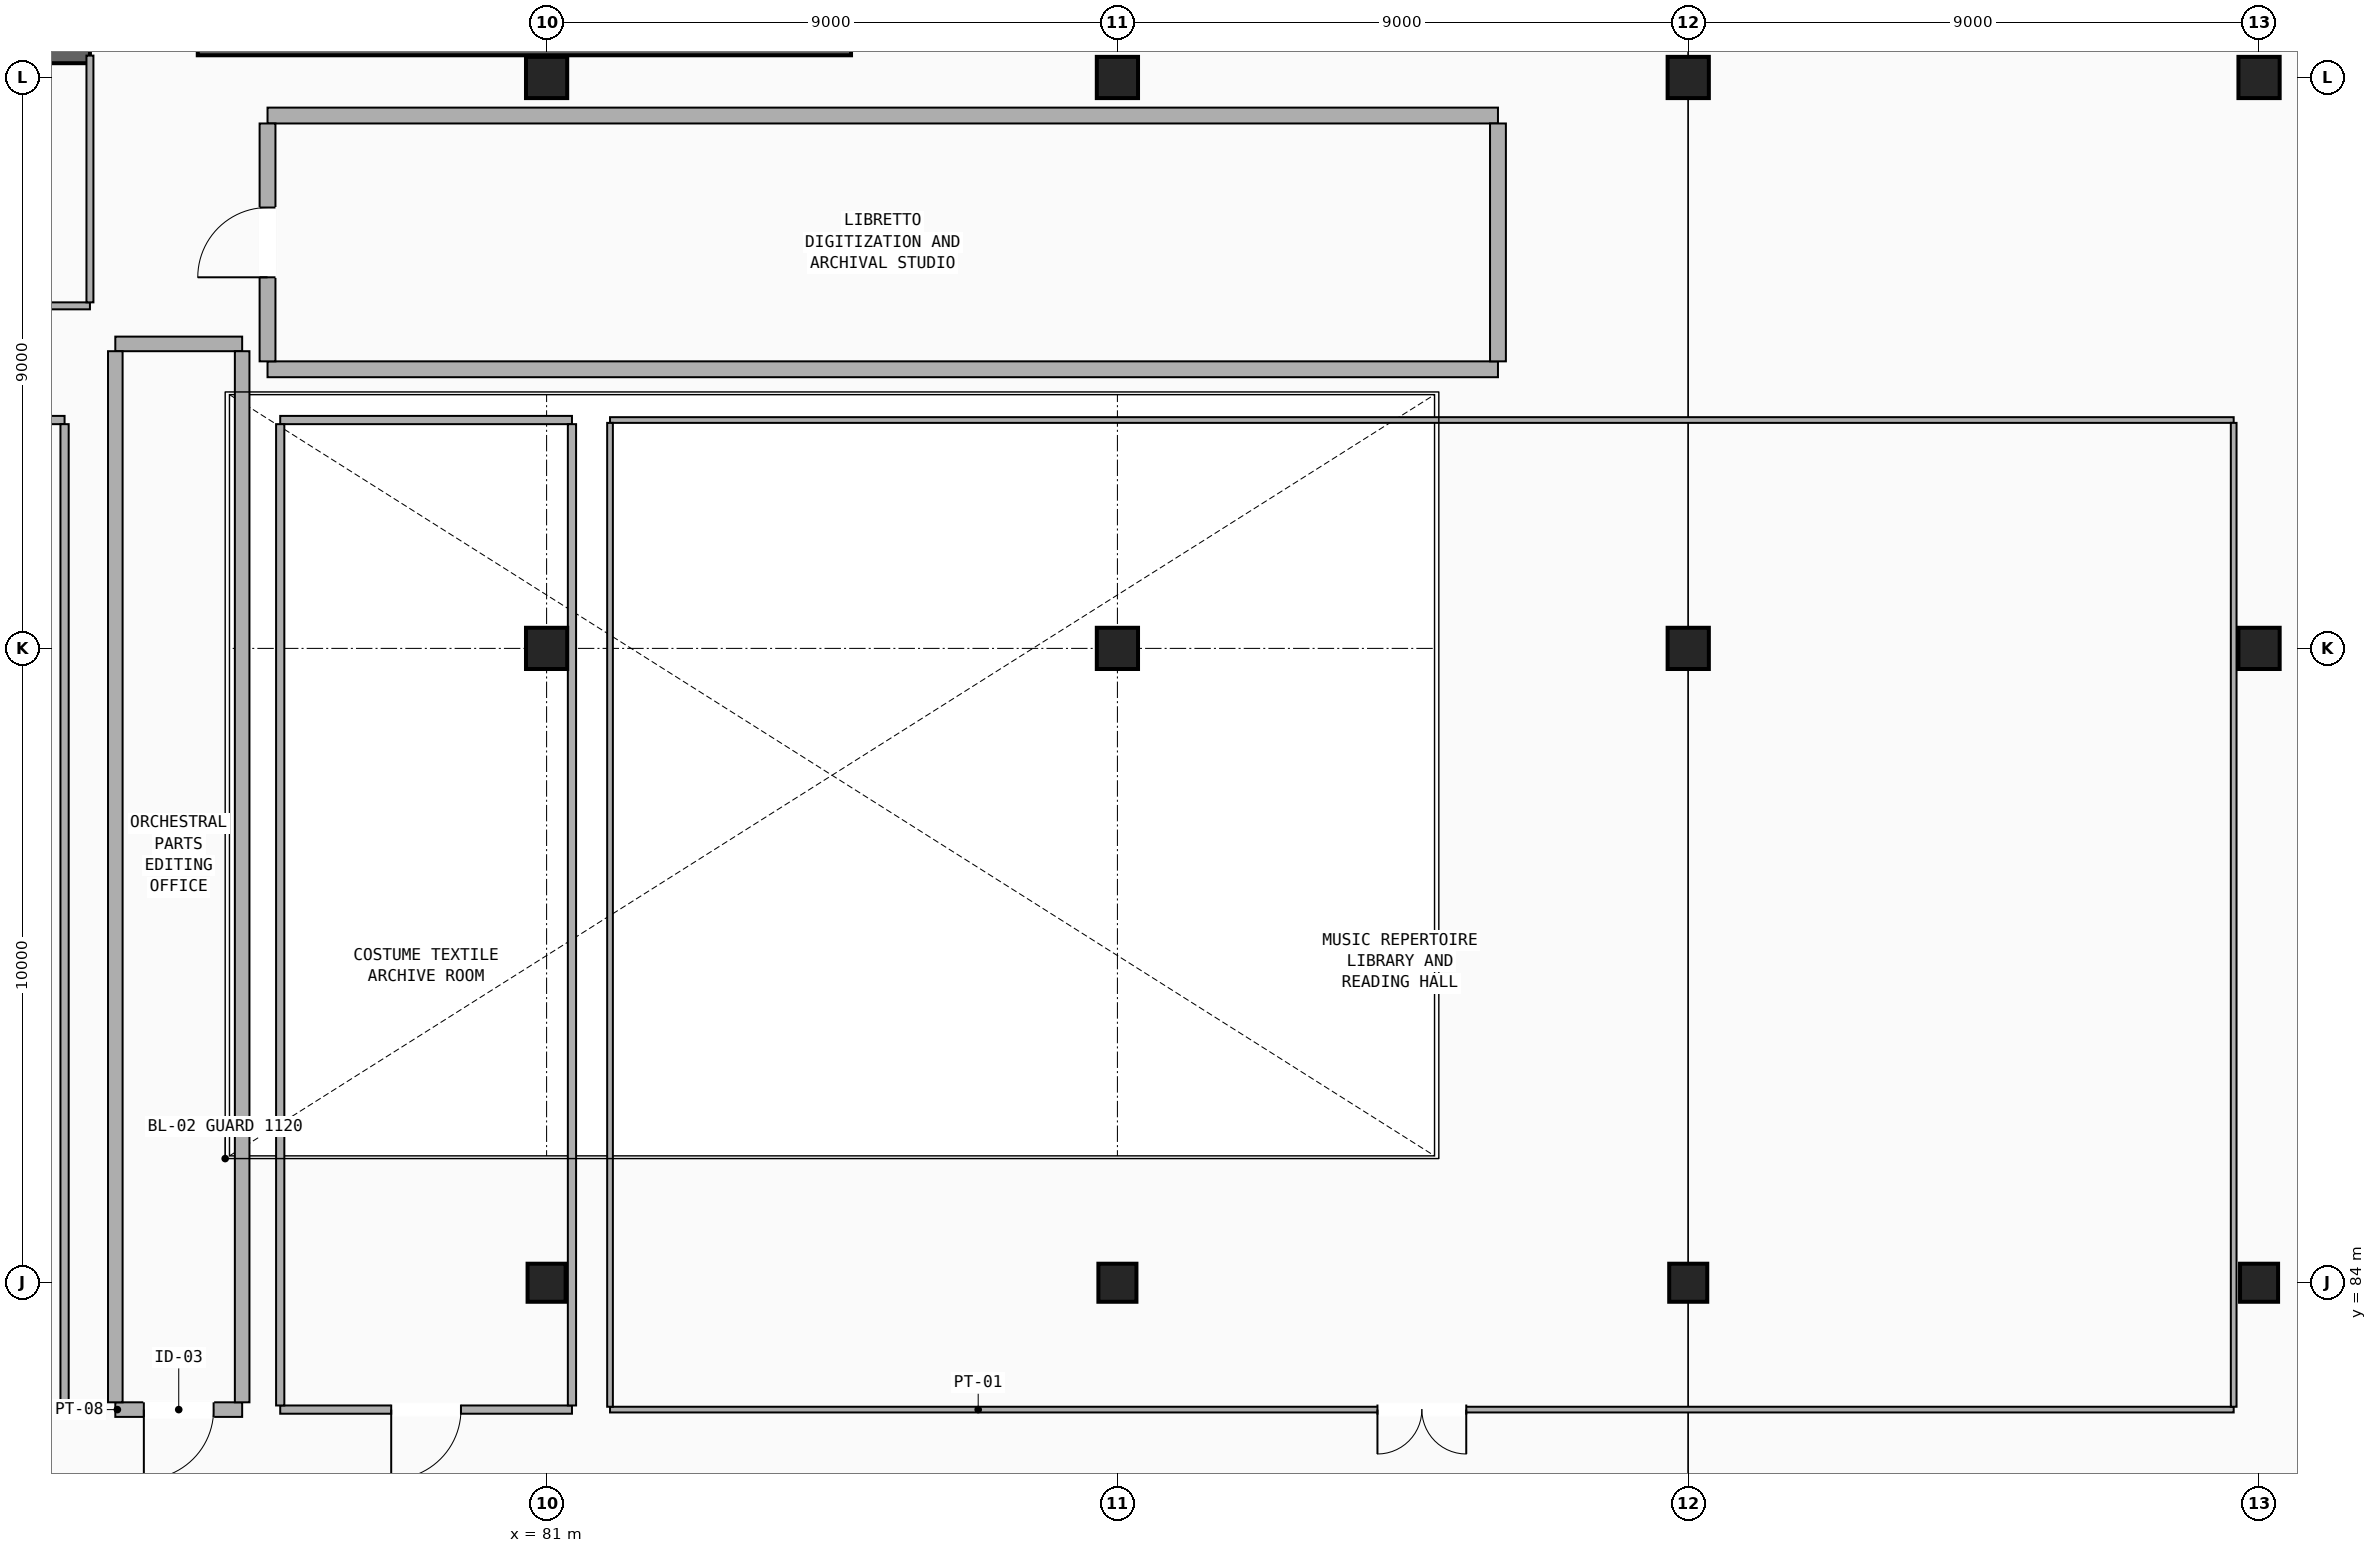
"""IFC4 building model, lengths in metres.
Left out: names, types, materials, properties, quantities, classifications, styles, units other than length and angle.
Written with IfcOpenShell. Run it as: python <this file> out.ifc"""

import sys

from ifc_helpers import new_model, si_unit, direction, frame, frame_2d, origin, origin_2d, place, context, subcontext, project, spatial, rectangle, extrude, element, fill, save


model = new_model("IFC4")
c1 = context("Model", 3, precision=1e-05, world=origin(), true_north=direction((0.0, 1.0)))
c2 = subcontext(c1, "Body", "Model", "MODEL_VIEW")
j1 = project(units=[si_unit("LENGTHUNIT", "METRE"), si_unit("PLANEANGLEUNIT", "RADIAN")], contexts=[c1])
p1 = place(None, origin())
s1 = spatial("IfcSite", under=j1, at=p1, CompositionType="ELEMENT")
p2 = place(p1, origin())
s2 = spatial("IfcBuilding", under=s1, at=p2, CompositionType="ELEMENT")
p3 = place(p2, frame((0.0, 0.0, 13.6)))
s3 = spatial("IfcBuildingStorey", under=s2, at=p3, CompositionType="ELEMENT", Elevation=13.6)
p4 = place(p3, frame((81.0, 84.0, 0.0), z_axis=(0.0, 0.0, 1.0), x_axis=(1.0, 0.0, 0.0)))
e1 = element("IfcColumn", 1, at=p4, inside=s3, PredefinedType="COLUMN", context=c2, shape_type="SweptSolid", body=[
    extrude(rectangle(XDim=0.6, YDim=0.6, at=origin_2d()), origin(), (0.0, 0.0, 1.0), 4.08),
])
for number, where, z_axis, x_axis in (
    (2, (81.0, 94.0, 0.0), (0.0, 0.0, 1.0), (1.0, 0.0, 0.0)),
    (3, (81.0, 103.0, 0.0), (0.0, 0.0, 1.0), (1.0, 0.0, 0.0)),
):
    element("IfcColumn", number, at=place(p3, frame(where, z_axis=z_axis, x_axis=x_axis)), inside=s3, PredefinedType="COLUMN", context=c2, shape_type="SweptSolid", body=[
        extrude(rectangle(XDim=0.65, YDim=0.65, at=origin_2d()), origin(), (0.0, 0.0, 1.0), 4.08),
    ])
p5 = place(p3, frame((90.0, 84.0, 0.0), z_axis=(0.0, 0.0, 1.0), x_axis=(1.0, 0.0, 0.0)))
e4 = element("IfcColumn", 4, at=p5, inside=s3, PredefinedType="COLUMN", context=c2, shape_type="SweptSolid", body=[
    extrude(rectangle(XDim=0.6, YDim=0.6, at=origin_2d()), origin(), (0.0, 0.0, 1.0), 4.08),
])
for number, where, z_axis, x_axis in (
    (5, (90.0, 94.0, 0.0), (0.0, 0.0, 1.0), (1.0, 0.0, 0.0)),
    (6, (90.0, 103.0, 0.0), (0.0, 0.0, 1.0), (1.0, 0.0, 0.0)),
):
    element("IfcColumn", number, at=place(p3, frame(where, z_axis=z_axis, x_axis=x_axis)), inside=s3, PredefinedType="COLUMN", context=c2, shape_type="SweptSolid", body=[
        extrude(rectangle(XDim=0.65, YDim=0.65, at=origin_2d()), origin(), (0.0, 0.0, 1.0), 4.08),
    ])
p6 = place(p3, frame((99.0, 84.0, 0.0), z_axis=(0.0, 0.0, 1.0), x_axis=(1.0, 0.0, 0.0)))
e7 = element("IfcColumn", 7, at=p6, inside=s3, PredefinedType="COLUMN", context=c2, shape_type="SweptSolid", body=[
    extrude(rectangle(XDim=0.6, YDim=0.6, at=origin_2d()), origin(), (0.0, 0.0, 1.0), 4.08),
])
for number, where, z_axis, x_axis in (
    (8, (99.0, 94.0, 0.0), (0.0, 0.0, 1.0), (1.0, 0.0, 0.0)),
    (9, (99.0, 103.0, 0.0), (0.0, 0.0, 1.0), (1.0, 0.0, 0.0)),
):
    element("IfcColumn", number, at=place(p3, frame(where, z_axis=z_axis, x_axis=x_axis)), inside=s3, PredefinedType="COLUMN", context=c2, shape_type="SweptSolid", body=[
        extrude(rectangle(XDim=0.65, YDim=0.65, at=origin_2d()), origin(), (0.0, 0.0, 1.0), 4.08),
    ])
p7 = place(p3, frame((108.0, 84.0, 0.0), z_axis=(0.0, 0.0, 1.0), x_axis=(1.0, 0.0, 0.0)))
e10 = element("IfcColumn", 10, at=p7, inside=s3, PredefinedType="COLUMN", context=c2, shape_type="SweptSolid", body=[
    extrude(rectangle(XDim=0.6, YDim=0.6, at=origin_2d()), origin(), (0.0, 0.0, 1.0), 4.08),
])
for number, where, z_axis, x_axis in (
    (11, (108.0, 94.0, 0.0), (0.0, 0.0, 1.0), (1.0, 0.0, 0.0)),
    (12, (108.0, 103.0, 0.0), (0.0, 0.0, 1.0), (1.0, 0.0, 0.0)),
):
    element("IfcColumn", number, at=place(p3, frame(where, z_axis=z_axis, x_axis=x_axis)), inside=s3, PredefinedType="COLUMN", context=c2, shape_type="SweptSolid", body=[
        extrude(rectangle(XDim=0.65, YDim=0.65, at=origin_2d()), origin(), (0.0, 0.0, 1.0), 4.08),
    ])
p8 = place(p3, frame((63.5, 103.4, 0.0), z_axis=(0.0, 0.0, 1.0), x_axis=(1.0, 0.0, 0.0)))
e13 = element("IfcWall", 13, at=p8, inside=s3, PredefinedType="SHEAR", context=c2, shape_type="SweptSolid", body=[
    extrude(rectangle(XDim=10.3, YDim=0.35, at=frame_2d((5.15, 0.0))), origin(), (0.0, 0.0, 1.0), 4.08),
])
p9 = place(p8, frame((0.45, 0.0, 0.0)))
e14 = element("IfcOpeningElement", 14, at=p9, cuts=e13, PredefinedType="OPENING", context=c2, shape_type="SweptSolid", body=[
    extrude(rectangle(XDim=1.1, YDim=2.2, at=frame_2d((0.55, 1.1))), frame((0.0, 0.185, 0.0), z_axis=(0.0, -1.0, 0.0), x_axis=(1.0, 0.0, 0.0)), (0.0, 0.0, 1.0), 0.37),
])
p10 = place(p8, frame((5.54, 0.0, 0.0)))
e15 = element("IfcOpeningElement", 15, at=p10, cuts=e13, PredefinedType="OPENING", context=c2, shape_type="SweptSolid", body=[
    extrude(rectangle(XDim=1.12, YDim=2.16, at=frame_2d((0.56, 1.08))), frame((0.0, 0.185, 0.0), z_axis=(0.0, -1.0, 0.0), x_axis=(1.0, 0.0, 0.0)), (0.0, 0.0, 1.0), 0.37),
])
p11 = place(p3, frame((75.5, 103.5, 0.0), z_axis=(0.0, 0.0, 1.0), x_axis=(1.0, 0.0, 0.0)))
e16 = element("IfcWall", 16, at=p11, inside=s3, PredefinedType="SHEAR", context=c2, shape_type="SweptSolid", body=[
    extrude(rectangle(XDim=10.3, YDim=0.3, at=frame_2d((5.15, 0.0))), origin(), (0.0, 0.0, 1.0), 4.08),
])
p12 = place(p3, frame((63.5, 99.4, 0.0), z_axis=(0.0, 0.0, 1.0), x_axis=(1.0, 0.0, 0.0)))
e17 = element("IfcWall", 17, at=p12, inside=s3, PredefinedType="PARTITIONING", context=c2, shape_type="SweptSolid", body=[
    extrude(rectangle(XDim=10.3, YDim=0.11, at=frame_2d((5.15, 0.0))), origin(), (0.0, 0.0, 1.0), 3.14),
])
p13 = place(p12, frame((4.45, 0.0, 0.0)))
e18 = element("IfcOpeningElement", 18, at=p13, cuts=e17, PredefinedType="OPENING", context=c2, shape_type="SweptSolid", body=[
    extrude(rectangle(XDim=1.4, YDim=2.2, at=frame_2d((0.7, 1.1))), frame((0.0, 0.065, 0.0), z_axis=(0.0, -1.0, 0.0), x_axis=(1.0, 0.0, 0.0)), (0.0, 0.0, 1.0), 0.13),
])
p14 = place(p3, frame((73.8, 99.455, 0.0), z_axis=(0.0, 0.0, 1.0), x_axis=(0.0, 1.0, 0.0)))
e19 = element("IfcWall", 19, at=p14, inside=s3, PredefinedType="PARTITIONING", context=c2, shape_type="SweptSolid", body=[
    extrude(rectangle(XDim=3.89, YDim=0.11, at=frame_2d((1.945, 0.0))), origin(), (0.0, 0.0, 1.0), 2.97),
])
p15 = place(p3, frame((82.0, 82.0, 0.0), z_axis=(0.0, 0.0, 1.0), x_axis=(1.0, 0.0, 0.0)))
e20 = element("IfcWall", 20, at=p15, inside=s3, PredefinedType="PARTITIONING", context=c2, shape_type="SweptSolid", body=[
    extrude(rectangle(XDim=25.6, YDim=0.09, at=frame_2d((12.8, 0.0))), origin(), (0.0, 0.0, 1.0), 3.11),
])
p16 = place(p15, frame((12.1, 0.0, 0.0)))
e21 = element("IfcOpeningElement", 21, at=p16, cuts=e20, PredefinedType="OPENING", context=c2, shape_type="SweptSolid", body=[
    extrude(rectangle(XDim=1.4, YDim=2.2, at=frame_2d((0.7, 1.1))), frame((0.0, 0.055, 0.0), z_axis=(0.0, -1.0, 0.0), x_axis=(1.0, 0.0, 0.0)), (0.0, 0.0, 1.0), 0.11),
])
p17 = place(p3, frame((82.0, 97.6, 0.0), z_axis=(0.0, 0.0, 1.0), x_axis=(1.0, 0.0, 0.0)))
e22 = element("IfcWall", 22, at=p17, inside=s3, PredefinedType="PARTITIONING", context=c2, shape_type="SweptSolid", body=[
    extrude(rectangle(XDim=25.6, YDim=0.09, at=frame_2d((12.8, 0.0))), origin(), (0.0, 0.0, 1.0), 2.97),
])
p18 = place(p3, frame((82.0, 82.045, 0.0), z_axis=(0.0, 0.0, 1.0), x_axis=(0.0, 1.0, 0.0)))
e23 = element("IfcWall", 23, at=p18, inside=s3, PredefinedType="PARTITIONING", context=c2, shape_type="SweptSolid", body=[
    extrude(rectangle(XDim=15.51, YDim=0.09, at=frame_2d((7.755, 0.0))), origin(), (0.0, 0.0, 1.0), 2.92),
])
p19 = place(p3, frame((107.6, 82.045, 0.0), z_axis=(0.0, 0.0, 1.0), x_axis=(0.0, 1.0, 0.0)))
e24 = element("IfcWall", 24, at=p19, inside=s3, PredefinedType="PARTITIONING", context=c2, shape_type="SweptSolid", body=[
    extrude(rectangle(XDim=15.51, YDim=0.09, at=frame_2d((7.755, 0.0))), origin(), (0.0, 0.0, 1.0), 2.82),
])
p20 = place(p3, frame((74.2, 82.0, 0.0), z_axis=(0.0, 0.0, 1.0), x_axis=(1.0, 0.0, 0.0)))
e25 = element("IfcWall", 25, at=p20, inside=s3, PredefinedType="PARTITIONING", context=c2, shape_type="SweptSolid", body=[
    extrude(rectangle(XDim=2.0, YDim=0.23, at=frame_2d((1.0, 0.0))), origin(), (0.0, 0.0, 1.0), 3.84),
])
p21 = place(p20, frame((0.45, 0.0, 0.0)))
e26 = element("IfcOpeningElement", 26, at=p21, cuts=e25, PredefinedType="OPENING", context=c2, shape_type="SweptSolid", body=[
    extrude(rectangle(XDim=1.1, YDim=2.2, at=frame_2d((0.55, 1.1))), frame((0.0, 0.125, 0.0), z_axis=(0.0, -1.0, 0.0), x_axis=(1.0, 0.0, 0.0)), (0.0, 0.0, 1.0), 0.25),
])
p22 = place(p3, frame((74.2, 98.8, 0.0), z_axis=(0.0, 0.0, 1.0), x_axis=(1.0, 0.0, 0.0)))
e27 = element("IfcWall", 27, at=p22, inside=s3, PredefinedType="PARTITIONING", context=c2, shape_type="SweptSolid", body=[
    extrude(rectangle(XDim=2.0, YDim=0.23, at=frame_2d((1.0, 0.0))), origin(), (0.0, 0.0, 1.0), 3.22),
])
for number, where, z_axis, x_axis in (
    (28, (74.2, 82.115, 0.0), (0.0, 0.0, 1.0), (0.0, 1.0, 0.0)),
    (29, (76.2, 82.115, 0.0), (0.0, 0.0, 1.0), (0.0, 1.0, 0.0)),
):
    element("IfcWall", number, at=place(p3, frame(where, z_axis=z_axis, x_axis=x_axis)), inside=s3, PredefinedType="PARTITIONING", context=c2, shape_type="SweptSolid", body=[
        extrude(rectangle(XDim=16.57, YDim=0.23, at=frame_2d((8.285, 0.0))), origin(), (0.0, 0.0, 1.0), 2.82),
    ])
p23 = place(p3, frame((63.6, 82.0, 0.0), z_axis=(0.0, 0.0, 1.0), x_axis=(1.0, 0.0, 0.0)))
e30 = element("IfcWall", 30, at=p23, inside=s3, PredefinedType="PARTITIONING", context=c2, shape_type="SweptSolid", body=[
    extrude(rectangle(XDim=9.8, YDim=0.13, at=frame_2d((4.9, 0.0))), origin(), (0.0, 0.0, 1.0), 2.94),
])
p24 = place(p23, frame((4.3, 0.0, 0.0)))
e31 = element("IfcOpeningElement", 31, at=p24, cuts=e30, PredefinedType="OPENING", context=c2, shape_type="SweptSolid", body=[
    extrude(rectangle(XDim=1.2, YDim=2.2, at=frame_2d((0.6, 1.1))), frame((0.0, 0.075, 0.0), z_axis=(0.0, -1.0, 0.0), x_axis=(1.0, 0.0, 0.0)), (0.0, 0.0, 1.0), 0.15),
])
p25 = place(p3, frame((63.6, 97.6, 0.0), z_axis=(0.0, 0.0, 1.0), x_axis=(1.0, 0.0, 0.0)))
e32 = element("IfcWall", 32, at=p25, inside=s3, PredefinedType="PARTITIONING", context=c2, shape_type="SweptSolid", body=[
    extrude(rectangle(XDim=9.8, YDim=0.13, at=frame_2d((4.9, 0.0))), origin(), (0.0, 0.0, 1.0), 3.14),
])
p26 = place(p3, frame((73.4, 82.065, 0.0), z_axis=(0.0, 0.0, 1.0), x_axis=(0.0, 1.0, 0.0)))
e33 = element("IfcWall", 33, at=p26, inside=s3, PredefinedType="PARTITIONING", context=c2, shape_type="SweptSolid", body=[
    extrude(rectangle(XDim=15.47, YDim=0.13, at=frame_2d((7.735, 0.0))), origin(), (0.0, 0.0, 1.0), 2.82),
])
for number, where, z_axis, x_axis in (
    (34, (76.6, 98.4, 0.0), (0.0, 0.0, 1.0), (1.0, 0.0, 0.0)),
    (35, (76.6, 102.4, 0.0), (0.0, 0.0, 1.0), (1.0, 0.0, 0.0)),
):
    element("IfcWall", number, at=place(p3, frame(where, z_axis=z_axis, x_axis=x_axis)), inside=s3, PredefinedType="PARTITIONING", context=c2, shape_type="SweptSolid", body=[
        extrude(rectangle(XDim=19.4, YDim=0.25, at=frame_2d((9.7, 0.0))), origin(), (0.0, 0.0, 1.0), 2.97),
    ])
p27 = place(p3, frame((76.6, 98.525, 0.0), z_axis=(0.0, 0.0, 1.0), x_axis=(0.0, 1.0, 0.0)))
e36 = element("IfcWall", 36, at=p27, inside=s3, PredefinedType="PARTITIONING", context=c2, shape_type="SweptSolid", body=[
    extrude(rectangle(XDim=3.75, YDim=0.25, at=frame_2d((1.875, 0.0))), origin(), (0.0, 0.0, 1.0), 3.22),
])
p28 = place(p27, frame((1.325, 0.0, 0.0)))
e37 = element("IfcOpeningElement", 37, at=p28, cuts=e36, PredefinedType="OPENING", context=c2, shape_type="SweptSolid", body=[
    extrude(rectangle(XDim=1.1, YDim=2.2, at=frame_2d((0.55, 1.1))), frame((0.0, 0.135, 0.0), z_axis=(0.0, -1.0, 0.0), x_axis=(1.0, 0.0, 0.0)), (0.0, 0.0, 1.0), 0.27),
])
p29 = place(p3, frame((96.0, 98.525, 0.0), z_axis=(0.0, 0.0, 1.0), x_axis=(0.0, 1.0, 0.0)))
e38 = element("IfcWall", 38, at=p29, inside=s3, PredefinedType="PARTITIONING", context=c2, shape_type="SweptSolid", body=[
    extrude(rectangle(XDim=3.75, YDim=0.25, at=frame_2d((1.875, 0.0))), origin(), (0.0, 0.0, 1.0), 3.413),
])
p30 = place(p3, frame((76.8, 82.0, 0.0), z_axis=(0.0, 0.0, 1.0), x_axis=(1.0, 0.0, 0.0)))
e39 = element("IfcWall", 39, at=p30, inside=s3, PredefinedType="PARTITIONING", context=c2, shape_type="SweptSolid", body=[
    extrude(rectangle(XDim=4.6, YDim=0.13, at=frame_2d((2.3, 0.0))), origin(), (0.0, 0.0, 1.0), 3.14),
])
p31 = place(p30, frame((1.75, 0.0, 0.0)))
e40 = element("IfcOpeningElement", 40, at=p31, cuts=e39, PredefinedType="OPENING", context=c2, shape_type="SweptSolid", body=[
    extrude(rectangle(XDim=1.1, YDim=2.2, at=frame_2d((0.55, 1.1))), frame((0.0, 0.075, 0.0), z_axis=(0.0, -1.0, 0.0), x_axis=(1.0, 0.0, 0.0)), (0.0, 0.0, 1.0), 0.15),
])
p32 = place(p3, frame((76.8, 97.6, 0.0), z_axis=(0.0, 0.0, 1.0), x_axis=(1.0, 0.0, 0.0)))
e41 = element("IfcWall", 41, at=p32, inside=s3, PredefinedType="PARTITIONING", context=c2, shape_type="SweptSolid", body=[
    extrude(rectangle(XDim=4.6, YDim=0.13, at=frame_2d((2.3, 0.0))), origin(), (0.0, 0.0, 1.0), 3.12),
])
p33 = place(p3, frame((76.8, 82.065, 0.0), z_axis=(0.0, 0.0, 1.0), x_axis=(0.0, 1.0, 0.0)))
e42 = element("IfcWall", 42, at=p33, inside=s3, PredefinedType="PARTITIONING", context=c2, shape_type="SweptSolid", body=[
    extrude(rectangle(XDim=15.47, YDim=0.13, at=frame_2d((7.735, 0.0))), origin(), (0.0, 0.0, 1.0), 2.82),
])
p34 = place(p3, frame((81.4, 82.065, 0.0), z_axis=(0.0, 0.0, 1.0), x_axis=(0.0, 1.0, 0.0)))
e43 = element("IfcWall", 43, at=p34, inside=s3, PredefinedType="PARTITIONING", context=c2, shape_type="SweptSolid", body=[
    extrude(rectangle(XDim=15.47, YDim=0.13, at=frame_2d((7.735, 0.0))), origin(), (0.0, 0.0, 1.0), 2.92),
])
p35 = place(p16, frame((1.4, 0.0, 0.0), z_axis=(0.0, 0.0, 1.0), x_axis=(-1.0, 0.0, 0.0)))
e44 = element("IfcDoor", 44, at=p35, inside=s3, OperationType="DOUBLE_DOOR_SINGLE_SWING", PredefinedType="DOOR", context=c2, shape_type="SweptSolid", body=[
    extrude(rectangle(XDim=1.4, YDim=2.2, at=frame_2d((0.7, 1.1))), frame((0.0, 0.025, 0.0), z_axis=(0.0, -1.0, 0.0), x_axis=(1.0, 0.0, 0.0)), (0.0, 0.0, 1.0), 0.05),
])
fill(e21, e44)
p36 = place(p21, frame((1.1, 0.0, 0.0), z_axis=(0.0, 0.0, 1.0), x_axis=(-1.0, 0.0, 0.0)))
e45 = element("IfcDoor", 45, at=p36, inside=s3, OperationType="SINGLE_SWING_RIGHT", PredefinedType="DOOR", context=c2, shape_type="SweptSolid", body=[
    extrude(rectangle(XDim=1.1, YDim=2.2, at=frame_2d((0.55, 1.1))), frame((0.0, 0.025, 0.0), z_axis=(0.0, -1.0, 0.0), x_axis=(1.0, 0.0, 0.0)), (0.0, 0.0, 1.0), 0.05),
])
fill(e26, e45)
p37 = place(p28, origin())
e46 = element("IfcDoor", 46, at=p37, inside=s3, OperationType="SINGLE_SWING_LEFT", PredefinedType="DOOR", context=c2, shape_type="SweptSolid", body=[
    extrude(rectangle(XDim=1.1, YDim=2.2, at=frame_2d((0.55, 1.1))), frame((0.0, 0.025, 0.0), z_axis=(0.0, -1.0, 0.0), x_axis=(1.0, 0.0, 0.0)), (0.0, 0.0, 1.0), 0.05),
])
fill(e37, e46)
p38 = place(p31, frame((1.1, 0.0, 0.0), z_axis=(0.0, 0.0, 1.0), x_axis=(-1.0, 0.0, 0.0)))
e47 = element("IfcDoor", 47, at=p38, inside=s3, OperationType="SINGLE_SWING_RIGHT", PredefinedType="DOOR", context=c2, shape_type="SweptSolid", body=[
    extrude(rectangle(XDim=1.1, YDim=2.2, at=frame_2d((0.55, 1.1))), frame((0.0, 0.025, 0.0), z_axis=(0.0, -1.0, 0.0), x_axis=(1.0, 0.0, 0.0)), (0.0, 0.0, 1.0), 0.05),
])
fill(e40, e47)
save(model, sys.argv[1])
